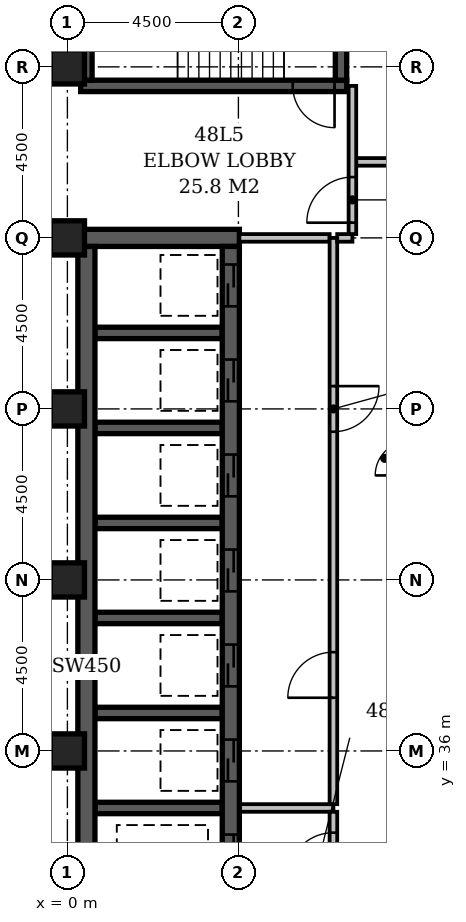
"""IFC4 building model, lengths in metres.
Left out: names, types, materials, properties, quantities, classifications, styles, units other than length and angle.
Written with IfcOpenShell. Run it as: python <this file> out.ifc"""

import sys

from ifc_helpers import new_model, si_unit, direction, frame, frame_2d, origin, origin_2d, place, context, subcontext, project, spatial, rectangle, extrude, element, fill, save


model = new_model("IFC4")
c1 = context("Model", 3, precision=1e-05, world=origin(), true_north=direction((0.0, 1.0)))
c2 = subcontext(c1, "Body", "Model", "MODEL_VIEW")
j1 = project(units=[si_unit("LENGTHUNIT", "METRE"), si_unit("PLANEANGLEUNIT", "RADIAN")], contexts=[c1])
p1 = place(None, origin())
s1 = spatial("IfcSite", under=j1, at=p1, CompositionType="ELEMENT")
p2 = place(p1, origin())
s2 = spatial("IfcBuilding", under=s1, at=p2, CompositionType="ELEMENT")
p3 = place(p2, frame((0.0, 0.0, 189.8)))
s3 = spatial("IfcBuildingStorey", under=s2, at=p3, CompositionType="ELEMENT", Elevation=189.8)
p4 = place(p3, frame((0.275, 49.5, -0.3), z_axis=(0.0, 0.0, 1.0), x_axis=(1.0, 0.0, 0.0)))
e1 = element("IfcWall", 1, at=p4, inside=s3, PredefinedType="SHEAR", context=c2, shape_type="SweptSolid", body=[
    extrude(rectangle(XDim=4.25, YDim=0.45, at=frame_2d((2.125, 0.0))), origin(), (0.0, 0.0, 1.0), 3.6),
])
p5 = place(p3, frame((0.35, 53.5, -0.3), z_axis=(0.0, 0.0, 1.0), x_axis=(1.0, 0.0, 0.0)))
e2 = element("IfcWall", 2, at=p5, inside=s3, PredefinedType="SHEAR", context=c2, shape_type="SweptSolid", body=[
    extrude(rectangle(XDim=7.0, YDim=0.3, at=frame_2d((3.5, 0.0))), origin(), (0.0, 0.0, 1.0), 3.6),
])
p6 = place(p5, frame((5.58, 0.0, 0.3)))
e3 = element("IfcOpeningElement", 3, at=p6, cuts=e2, PredefinedType="OPENING", context=c2, shape_type="SweptSolid", body=[
    extrude(rectangle(XDim=1.1, YDim=2.1, at=frame_2d((0.55, 1.05))), frame((0.0, 0.162, 0.0), z_axis=(0.0, -1.0, 0.0), x_axis=(1.0, 0.0, 0.0)), (0.0, 0.0, 1.0), 0.324),
])
p7 = place(p3, frame((0.5, 27.15, -0.3), z_axis=(0.0, 0.0, 1.0), x_axis=(0.0, 1.0, 0.0)))
e4 = element("IfcWall", 4, at=p7, inside=s3, PredefinedType="SHEAR", context=c2, shape_type="SweptSolid", body=[
    extrude(rectangle(XDim=22.125, YDim=0.45, at=frame_2d((11.062, 0.0))), origin(), (0.0, 0.0, 1.0), 3.6),
])
p8 = place(p3, frame((0.5, 53.65, -0.3), z_axis=(0.0, 0.0, 1.0), x_axis=(0.0, 1.0, 0.0)))
e5 = element("IfcWall", 5, at=p8, inside=s3, PredefinedType="SHEAR", context=c2, shape_type="SweptSolid", body=[
    extrude(rectangle(XDim=4.2, YDim=0.3, at=frame_2d((2.1, 0.0))), origin(), (0.0, 0.0, 1.0), 3.6),
])
for number, where, z_axis, x_axis in (
    (6, (0.725, 34.5, -0.3), (0.0, 0.0, 1.0), (1.0, 0.0, 0.0)),
    (7, (0.725, 37.0, -0.3), (0.0, 0.0, 1.0), (1.0, 0.0, 0.0)),
    (8, (0.725, 39.5, -0.3), (0.0, 0.0, 1.0), (1.0, 0.0, 0.0)),
    (9, (0.725, 42.0, -0.3), (0.0, 0.0, 1.0), (1.0, 0.0, 0.0)),
    (10, (0.725, 44.5, -0.3), (0.0, 0.0, 1.0), (1.0, 0.0, 0.0)),
    (11, (0.725, 47.0, -0.3), (0.0, 0.0, 1.0), (1.0, 0.0, 0.0)),
):
    element("IfcWall", number, at=place(p3, frame(where, z_axis=z_axis, x_axis=x_axis)), inside=s3, PredefinedType="SHEAR", context=c2, shape_type="SweptSolid", body=[
        extrude(rectangle(XDim=3.35, YDim=0.3, at=frame_2d((1.675, 0.0))), origin(), (0.0, 0.0, 1.0), 3.6),
    ])
p9 = place(p3, frame((4.3, 27.15, -0.3), z_axis=(0.0, 0.0, 1.0), x_axis=(0.0, 1.0, 0.0)))
e12 = element("IfcWall", 12, at=p9, inside=s3, PredefinedType="SHEAR", context=c2, shape_type="SweptSolid", body=[
    extrude(rectangle(XDim=22.125, YDim=0.45, at=frame_2d((11.062, 0.0))), origin(), (0.0, 0.0, 1.0), 3.6),
])
p10 = place(p9, frame((3.05, 0.0, 0.3)))
e13 = element("IfcOpeningElement", 13, at=p10, cuts=e12, PredefinedType="OPENING", context=c2, shape_type="SweptSolid", body=[
    extrude(rectangle(XDim=1.1, YDim=2.1, at=frame_2d((0.55, 1.05))), frame((0.0, 0.237, 0.0), z_axis=(0.0, -1.0, 0.0), x_axis=(1.0, 0.0, 0.0)), (0.0, 0.0, 1.0), 0.474),
])
p11 = place(p9, frame((0.55, 0.0, 0.3)))
e14 = element("IfcOpeningElement", 14, at=p11, cuts=e12, PredefinedType="OPENING", context=c2, shape_type="SweptSolid", body=[
    extrude(rectangle(XDim=1.1, YDim=2.1, at=frame_2d((0.55, 1.05))), frame((0.0, 0.237, 0.0), z_axis=(0.0, -1.0, 0.0), x_axis=(1.0, 0.0, 0.0)), (0.0, 0.0, 1.0), 0.474),
])
p12 = place(p9, frame((20.55, 0.0, 0.3)))
e15 = element("IfcOpeningElement", 15, at=p12, cuts=e12, PredefinedType="OPENING", context=c2, shape_type="SweptSolid", body=[
    extrude(rectangle(XDim=1.1, YDim=2.1, at=frame_2d((0.55, 1.05))), frame((0.0, 0.237, 0.0), z_axis=(0.0, -1.0, 0.0), x_axis=(1.0, 0.0, 0.0)), (0.0, 0.0, 1.0), 0.474),
])
p13 = place(p9, frame((18.05, 0.0, 0.3)))
e16 = element("IfcOpeningElement", 16, at=p13, cuts=e12, PredefinedType="OPENING", context=c2, shape_type="SweptSolid", body=[
    extrude(rectangle(XDim=1.1, YDim=2.1, at=frame_2d((0.55, 1.05))), frame((0.0, 0.237, 0.0), z_axis=(0.0, -1.0, 0.0), x_axis=(1.0, 0.0, 0.0)), (0.0, 0.0, 1.0), 0.474),
])
p14 = place(p9, frame((15.55, 0.0, 0.3)))
e17 = element("IfcOpeningElement", 17, at=p14, cuts=e12, PredefinedType="OPENING", context=c2, shape_type="SweptSolid", body=[
    extrude(rectangle(XDim=1.1, YDim=2.1, at=frame_2d((0.55, 1.05))), frame((0.0, 0.237, 0.0), z_axis=(0.0, -1.0, 0.0), x_axis=(1.0, 0.0, 0.0)), (0.0, 0.0, 1.0), 0.474),
])
p15 = place(p9, frame((13.05, 0.0, 0.3)))
e18 = element("IfcOpeningElement", 18, at=p15, cuts=e12, PredefinedType="OPENING", context=c2, shape_type="SweptSolid", body=[
    extrude(rectangle(XDim=1.1, YDim=2.1, at=frame_2d((0.55, 1.05))), frame((0.0, 0.237, 0.0), z_axis=(0.0, -1.0, 0.0), x_axis=(1.0, 0.0, 0.0)), (0.0, 0.0, 1.0), 0.474),
])
p16 = place(p9, frame((10.55, 0.0, 0.3)))
e19 = element("IfcOpeningElement", 19, at=p16, cuts=e12, PredefinedType="OPENING", context=c2, shape_type="SweptSolid", body=[
    extrude(rectangle(XDim=1.1, YDim=2.1, at=frame_2d((0.55, 1.05))), frame((0.0, 0.237, 0.0), z_axis=(0.0, -1.0, 0.0), x_axis=(1.0, 0.0, 0.0)), (0.0, 0.0, 1.0), 0.474),
])
p17 = place(p9, frame((8.05, 0.0, 0.3)))
e20 = element("IfcOpeningElement", 20, at=p17, cuts=e12, PredefinedType="OPENING", context=c2, shape_type="SweptSolid", body=[
    extrude(rectangle(XDim=1.1, YDim=2.1, at=frame_2d((0.55, 1.05))), frame((0.0, 0.237, 0.0), z_axis=(0.0, -1.0, 0.0), x_axis=(1.0, 0.0, 0.0)), (0.0, 0.0, 1.0), 0.474),
])
p18 = place(p9, frame((5.55, 0.0, 0.3)))
e21 = element("IfcOpeningElement", 21, at=p18, cuts=e12, PredefinedType="OPENING", context=c2, shape_type="SweptSolid", body=[
    extrude(rectangle(XDim=1.1, YDim=2.1, at=frame_2d((0.55, 1.05))), frame((0.0, 0.237, 0.0), z_axis=(0.0, -1.0, 0.0), x_axis=(1.0, 0.0, 0.0)), (0.0, 0.0, 1.0), 0.474),
])
p19 = place(p3, frame((7.2, 53.65, -0.3), z_axis=(0.0, 0.0, 1.0), x_axis=(0.0, 1.0, 0.0)))
e22 = element("IfcWall", 22, at=p19, inside=s3, PredefinedType="SHEAR", context=c2, shape_type="SweptSolid", body=[
    extrude(rectangle(XDim=4.2, YDim=0.3, at=frame_2d((2.1, 0.0))), origin(), (0.0, 0.0, 1.0), 3.6),
])
for number, where, z_axis, x_axis in (
    (23, (0.0, 36.0, -0.3), (0.0, 0.0, 1.0), (1.0, 0.0, 0.0)),
    (24, (0.0, 40.5, -0.3), (0.0, 0.0, 1.0), (1.0, 0.0, 0.0)),
    (25, (0.0, 45.0, -0.3), (0.0, 0.0, 1.0), (1.0, 0.0, 0.0)),
    (26, (0.0, 49.5, -0.3), (0.0, 0.0, 1.0), (1.0, 0.0, 0.0)),
    (27, (0.0, 54.0, -0.3), (0.0, 0.0, 1.0), (1.0, 0.0, 0.0)),
):
    element("IfcColumn", number, at=place(p3, frame(where, z_axis=z_axis, x_axis=x_axis)), inside=s3, PredefinedType="COLUMN", context=c2, shape_type="SweptSolid", body=[
        extrude(rectangle(XDim=0.9, YDim=0.9, at=origin_2d()), origin(), (0.0, 0.0, 1.0), 3.6),
    ])
p20 = place(p3, frame((4.545, 34.5, 0.0), z_axis=(0.0, 0.0, 1.0), x_axis=(1.0, 0.0, 0.0)))
e28 = element("IfcWall", 28, at=p20, inside=s3, PredefinedType="PARTITIONING", context=c2, shape_type="SweptSolid", body=[
    extrude(rectangle(XDim=2.455, YDim=0.2, at=frame_2d((1.228, 0.0))), origin(), (0.0, 0.0, 1.0), 3.3),
])
p21 = place(p3, frame((7.0, 34.6, 0.0), z_axis=(0.0, 0.0, 1.0), x_axis=(0.0, 1.0, 0.0)))
e29 = element("IfcWall", 29, at=p21, inside=s3, PredefinedType="PARTITIONING", context=c2, shape_type="SweptSolid", body=[
    extrude(rectangle(XDim=14.9, YDim=0.2, at=frame_2d((7.45, 0.0))), origin(), (0.0, 0.0, 1.0), 3.3),
])
p22 = place(p21, frame((2.8, 0.0, 0.0)))
e30 = element("IfcOpeningElement", 30, at=p22, cuts=e29, PredefinedType="OPENING", context=c2, shape_type="SweptSolid", body=[
    extrude(rectangle(XDim=1.2, YDim=2.1, at=frame_2d((0.6, 1.05))), frame((0.0, 0.112, 0.0), z_axis=(0.0, -1.0, 0.0), x_axis=(1.0, 0.0, 0.0)), (0.0, 0.0, 1.0), 0.224),
])
p23 = place(p21, frame((9.8, 0.0, 0.0)))
e31 = element("IfcOpeningElement", 31, at=p23, cuts=e29, PredefinedType="OPENING", context=c2, shape_type="SweptSolid", body=[
    extrude(rectangle(XDim=1.2, YDim=2.1, at=frame_2d((0.6, 1.05))), frame((0.0, 0.112, 0.0), z_axis=(0.0, -1.0, 0.0), x_axis=(1.0, 0.0, 0.0)), (0.0, 0.0, 1.0), 0.224),
])
p24 = place(p3, frame((4.525, 49.5, 0.0), z_axis=(0.0, 0.0, 1.0), x_axis=(1.0, 0.0, 0.0)))
e32 = element("IfcWall", 32, at=p24, inside=s3, PredefinedType="PARTITIONING", context=c2, shape_type="SweptSolid", body=[
    extrude(rectangle(XDim=2.375, YDim=0.2, at=frame_2d((1.188, 0.0))), origin(), (0.0, 0.0, 1.0), 3.3),
])
p25 = place(p3, frame((7.0, 32.1, 0.0), z_axis=(0.0, 0.0, 1.0), x_axis=(0.0, 1.0, 0.0)))
e33 = element("IfcWall", 33, at=p25, inside=s3, PredefinedType="PARTITIONING", context=c2, shape_type="SweptSolid", body=[
    extrude(rectangle(XDim=2.3, YDim=0.2, at=frame_2d((1.15, 0.0))), origin(), (0.0, 0.0, 1.0), 3.3),
])
p26 = place(p25, frame((0.55, 0.0, 0.0)))
e34 = element("IfcOpeningElement", 34, at=p26, cuts=e33, PredefinedType="OPENING", context=c2, shape_type="SweptSolid", body=[
    extrude(rectangle(XDim=1.2, YDim=2.1, at=frame_2d((0.6, 1.05))), frame((0.0, 0.112, 0.0), z_axis=(0.0, -1.0, 0.0), x_axis=(1.0, 0.0, 0.0)), (0.0, 0.0, 1.0), 0.224),
])
p27 = place(p3, frame((7.1, 49.5, 0.0), z_axis=(0.0, 0.0, 1.0), x_axis=(1.0, 0.0, 0.0)))
e35 = element("IfcWall", 35, at=p27, inside=s3, PredefinedType="PARTITIONING", context=c2, shape_type="SweptSolid", body=[
    extrude(rectangle(XDim=0.4, YDim=0.2, at=frame_2d((0.2, 0.0))), origin(), (0.0, 0.0, 1.0), 3.3),
])
p28 = place(p3, frame((7.5, 49.6, 0.0), z_axis=(0.0, 0.0, 1.0), x_axis=(0.0, 1.0, 0.0)))
e36 = element("IfcWall", 36, at=p28, inside=s3, PredefinedType="PARTITIONING", context=c2, shape_type="SweptSolid", body=[
    extrude(rectangle(XDim=3.9, YDim=0.2, at=frame_2d((1.95, 0.0))), origin(), (0.0, 0.0, 1.0), 3.3),
])
p29 = place(p28, frame((0.3, 0.0, 0.0)))
e37 = element("IfcOpeningElement", 37, at=p29, cuts=e36, PredefinedType="OPENING", context=c2, shape_type="SweptSolid", body=[
    extrude(rectangle(XDim=1.2, YDim=2.1, at=frame_2d((0.6, 1.05))), frame((0.0, 0.112, 0.0), z_axis=(0.0, -1.0, 0.0), x_axis=(1.0, 0.0, 0.0)), (0.0, 0.0, 1.0), 0.224),
])
p30 = place(p3, frame((7.6, 51.5, 0.0), z_axis=(0.0, 0.0, 1.0), x_axis=(1.0, 0.0, 0.0)))
e38 = element("IfcWall", 38, at=p30, inside=s3, PredefinedType="PARTITIONING", context=c2, shape_type="SweptSolid", body=[
    extrude(rectangle(XDim=15.3, YDim=0.2, at=frame_2d((7.65, 0.0))), origin(), (0.0, 0.0, 1.0), 3.3),
])
p31 = place(p30, frame((7.2, 0.0, 0.0)))
e39 = element("IfcOpeningElement", 39, at=p31, cuts=e38, PredefinedType="OPENING", context=c2, shape_type="SweptSolid", body=[
    extrude(rectangle(XDim=0.9, YDim=2.1, at=frame_2d((0.45, 1.05))), frame((0.0, 0.112, 0.0), z_axis=(0.0, -1.0, 0.0), x_axis=(1.0, 0.0, 0.0)), (0.0, 0.0, 1.0), 0.224),
])
p32 = place(p29, origin())
e40 = element("IfcDoor", 40, at=p32, inside=s3, OperationType="SINGLE_SWING_LEFT", PredefinedType="DOOR", context=c2, shape_type="SweptSolid", body=[
    extrude(rectangle(XDim=1.2, YDim=2.1, at=frame_2d((0.6, 1.05))), frame((0.0, 0.025, 0.0), z_axis=(0.0, -1.0, 0.0), x_axis=(1.0, 0.0, 0.0)), (0.0, 0.0, 1.0), 0.05),
])
fill(e37, e40)
p33 = place(p12, origin())
e41 = element("IfcDoor", 41, at=p33, inside=s3, OperationType="SLIDING_TO_LEFT", PredefinedType="DOOR", context=c2, shape_type="SweptSolid", body=[
    extrude(rectangle(XDim=1.1, YDim=2.1, at=frame_2d((0.55, 1.05))), frame((0.0, 0.025, 0.0), z_axis=(0.0, -1.0, 0.0), x_axis=(1.0, 0.0, 0.0)), (0.0, 0.0, 1.0), 0.05),
])
fill(e15, e41)
p34 = place(p13, origin())
e42 = element("IfcDoor", 42, at=p34, inside=s3, OperationType="SLIDING_TO_LEFT", PredefinedType="DOOR", context=c2, shape_type="SweptSolid", body=[
    extrude(rectangle(XDim=1.1, YDim=2.1, at=frame_2d((0.55, 1.05))), frame((0.0, 0.025, 0.0), z_axis=(0.0, -1.0, 0.0), x_axis=(1.0, 0.0, 0.0)), (0.0, 0.0, 1.0), 0.05),
])
fill(e16, e42)
p35 = place(p14, origin())
e43 = element("IfcDoor", 43, at=p35, inside=s3, OperationType="SLIDING_TO_LEFT", PredefinedType="DOOR", context=c2, shape_type="SweptSolid", body=[
    extrude(rectangle(XDim=1.1, YDim=2.1, at=frame_2d((0.55, 1.05))), frame((0.0, 0.025, 0.0), z_axis=(0.0, -1.0, 0.0), x_axis=(1.0, 0.0, 0.0)), (0.0, 0.0, 1.0), 0.05),
])
fill(e17, e43)
p36 = place(p15, origin())
e44 = element("IfcDoor", 44, at=p36, inside=s3, OperationType="SLIDING_TO_LEFT", PredefinedType="DOOR", context=c2, shape_type="SweptSolid", body=[
    extrude(rectangle(XDim=1.1, YDim=2.1, at=frame_2d((0.55, 1.05))), frame((0.0, 0.025, 0.0), z_axis=(0.0, -1.0, 0.0), x_axis=(1.0, 0.0, 0.0)), (0.0, 0.0, 1.0), 0.05),
])
fill(e18, e44)
p37 = place(p16, origin())
e45 = element("IfcDoor", 45, at=p37, inside=s3, OperationType="SLIDING_TO_LEFT", PredefinedType="DOOR", context=c2, shape_type="SweptSolid", body=[
    extrude(rectangle(XDim=1.1, YDim=2.1, at=frame_2d((0.55, 1.05))), frame((0.0, 0.025, 0.0), z_axis=(0.0, -1.0, 0.0), x_axis=(1.0, 0.0, 0.0)), (0.0, 0.0, 1.0), 0.05),
])
fill(e19, e45)
p38 = place(p17, origin())
e46 = element("IfcDoor", 46, at=p38, inside=s3, OperationType="SLIDING_TO_LEFT", PredefinedType="DOOR", context=c2, shape_type="SweptSolid", body=[
    extrude(rectangle(XDim=1.1, YDim=2.1, at=frame_2d((0.55, 1.05))), frame((0.0, 0.025, 0.0), z_axis=(0.0, -1.0, 0.0), x_axis=(1.0, 0.0, 0.0)), (0.0, 0.0, 1.0), 0.05),
])
fill(e20, e46)
p39 = place(p22, origin())
e47 = element("IfcDoor", 47, at=p39, inside=s3, OperationType="SINGLE_SWING_LEFT", PredefinedType="DOOR", context=c2, shape_type="SweptSolid", body=[
    extrude(rectangle(XDim=1.2, YDim=2.1, at=frame_2d((0.6, 1.05))), frame((0.0, 0.025, 0.0), z_axis=(0.0, -1.0, 0.0), x_axis=(1.0, 0.0, 0.0)), (0.0, 0.0, 1.0), 0.05),
])
fill(e30, e47)
p40 = place(p23, origin())
e48 = element("IfcDoor", 48, at=p40, inside=s3, OperationType="SINGLE_SWING_RIGHT", PredefinedType="DOOR", context=c2, shape_type="SweptSolid", body=[
    extrude(rectangle(XDim=1.2, YDim=2.1, at=frame_2d((0.6, 1.05))), frame((0.0, 0.025, 0.0), z_axis=(0.0, -1.0, 0.0), x_axis=(1.0, 0.0, 0.0)), (0.0, 0.0, 1.0), 0.05),
])
fill(e31, e48)
p41 = place(p26, origin())
e49 = element("IfcDoor", 49, at=p41, inside=s3, OperationType="SINGLE_SWING_LEFT", PredefinedType="DOOR", context=c2, shape_type="SweptSolid", body=[
    extrude(rectangle(XDim=1.2, YDim=2.1, at=frame_2d((0.6, 1.05))), frame((0.0, 0.025, 0.0), z_axis=(0.0, -1.0, 0.0), x_axis=(1.0, 0.0, 0.0)), (0.0, 0.0, 1.0), 0.05),
])
fill(e34, e49)
p42 = place(p18, origin())
e50 = element("IfcDoor", 50, at=p42, inside=s3, OperationType="SLIDING_TO_LEFT", PredefinedType="DOOR", context=c2, shape_type="SweptSolid", body=[
    extrude(rectangle(XDim=1.1, YDim=2.1, at=frame_2d((0.55, 1.05))), frame((0.0, 0.025, 0.0), z_axis=(0.0, -1.0, 0.0), x_axis=(1.0, 0.0, 0.0)), (0.0, 0.0, 1.0), 0.05),
])
fill(e21, e50)
p43 = place(p6, origin())
e51 = element("IfcDoor", 51, at=p43, inside=s3, OperationType="SINGLE_SWING_RIGHT", PredefinedType="DOOR", context=c2, shape_type="SweptSolid", body=[
    extrude(rectangle(XDim=1.1, YDim=2.1, at=frame_2d((0.55, 1.05))), frame((0.0, 0.025, 0.0), z_axis=(0.0, -1.0, 0.0), x_axis=(1.0, 0.0, 0.0)), (0.0, 0.0, 1.0), 0.05),
])
fill(e3, e51)
save(model, sys.argv[1])
